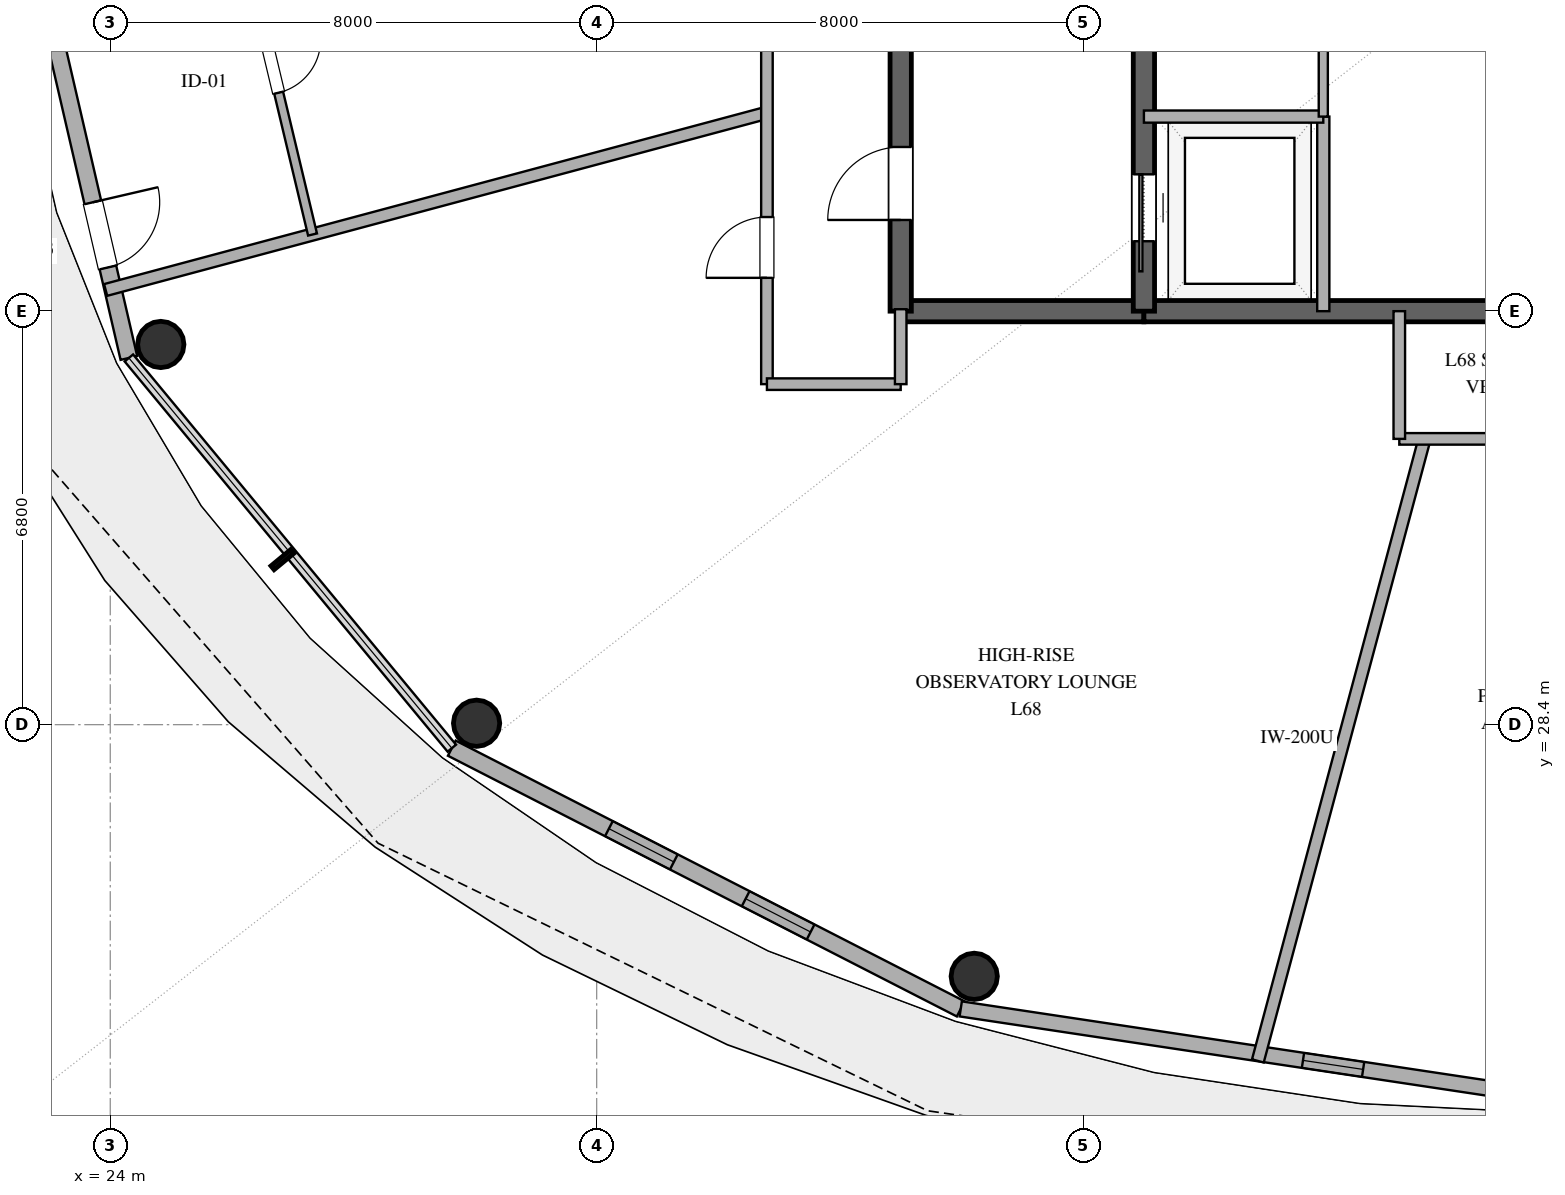
"""IFC4 building model, lengths in metres.
Left out: names, types, materials, properties, quantities, classifications, styles, units other than length and angle.
Written with IfcOpenShell. Run it as: python <this file> out.ifc"""

import sys

from ifc_helpers import new_model, si_unit, direction, frame, frame_2d, origin, origin_2d, place, context, subcontext, project, spatial, rectangle, hollow_circle, extrude, element, fill, save


model = new_model("IFC4")
c1 = context("Model", 3, precision=1e-05, world=origin(), true_north=direction((0.0, 1.0)))
c2 = subcontext(c1, "Body", "Model", "MODEL_VIEW")
j1 = project(units=[si_unit("LENGTHUNIT", "METRE"), si_unit("PLANEANGLEUNIT", "RADIAN")], contexts=[c1])
p1 = place(None, origin())
s1 = spatial("IfcSite", under=j1, at=p1, CompositionType="ELEMENT")
p2 = place(p1, origin())
s2 = spatial("IfcBuilding", under=s1, at=p2, CompositionType="ELEMENT")
p3 = place(p2, frame((0.0, 0.0, 265.8)))
s3 = spatial("IfcBuildingStorey", under=s2, at=p3, CompositionType="ELEMENT", Elevation=265.8)
p4 = place(p3, frame((37.0, 35.2, 0.0), z_axis=(0.0, 0.0, 1.0), x_axis=(1.0, 0.0, 0.0)))
e1 = element("IfcWall", 1, at=p4, inside=s3, PredefinedType="SHEAR", context=c2, shape_type="SweptSolid", body=[
    extrude(rectangle(XDim=4.0, YDim=0.35, at=frame_2d((2.0, 0.0))), origin(), (0.0, 0.0, 1.0), 3.37),
])
p5 = place(p3, frame((41.0, 35.2, 0.0), z_axis=(0.0, 0.0, 1.0), x_axis=(1.0, 0.0, 0.0)))
e2 = element("IfcWall", 2, at=p5, inside=s3, PredefinedType="SHEAR", context=c2, shape_type="SweptSolid", body=[
    extrude(rectangle(XDim=14.0, YDim=0.35, at=frame_2d((7.0, 0.0))), origin(), (0.0, 0.0, 1.0), 3.37),
])
p6 = place(p5, frame((6.1, 0.0, 0.0)))
e3 = element("IfcOpeningElement", 3, at=p6, cuts=e2, PredefinedType="OPENING", context=c2, shape_type="SweptSolid", body=[
    extrude(rectangle(XDim=1.8, YDim=2.25, at=frame_2d((0.9, 1.125))), frame((0.0, 0.185, 0.0), z_axis=(0.0, -1.0, 0.0), x_axis=(1.0, 0.0, 0.0)), (0.0, 0.0, 1.0), 0.37),
])
p7 = place(p3, frame((37.0, 35.2, 0.0), z_axis=(0.0, 0.0, 1.0), x_axis=(0.0, 1.0, 0.0)))
e4 = element("IfcWall", 4, at=p7, inside=s3, PredefinedType="SHEAR", context=c2, shape_type="SweptSolid", body=[
    extrude(rectangle(XDim=13.6, YDim=0.35, at=frame_2d((6.8, 0.0))), origin(), (0.0, 0.0, 1.0), 3.37),
])
p8 = place(p7, frame((1.5, 0.0, 0.0)))
e5 = element("IfcOpeningElement", 5, at=p8, cuts=e4, PredefinedType="OPENING", context=c2, shape_type="SweptSolid", body=[
    extrude(rectangle(XDim=1.2, YDim=2.15, at=frame_2d((0.6, 1.075))), frame((0.0, 0.185, 0.0), z_axis=(0.0, -1.0, 0.0), x_axis=(1.0, 0.0, 0.0)), (0.0, 0.0, 1.0), 0.37),
])
p9 = place(p3, frame((41.0, 35.2, 0.0), z_axis=(0.0, 0.0, 1.0), x_axis=(0.0, 1.0, 0.0)))
e6 = element("IfcWall", 6, at=p9, inside=s3, PredefinedType="SHEAR", context=c2, shape_type="SweptSolid", body=[
    extrude(rectangle(XDim=13.6, YDim=0.35, at=frame_2d((6.8, 0.0))), origin(), (0.0, 0.0, 1.0), 3.37),
])
p10 = place(p9, frame((1.15, 0.0, 0.0)))
e7 = element("IfcOpeningElement", 7, at=p10, cuts=e6, PredefinedType="OPENING", context=c2, shape_type="SweptSolid", body=[
    extrude(rectangle(XDim=1.1, YDim=2.2, at=frame_2d((0.55, 1.1))), frame((0.0, 0.185, 0.0), z_axis=(0.0, -1.0, 0.0), x_axis=(1.0, 0.0, 0.0)), (0.0, 0.0, 1.0), 0.37),
])
for number, where, z_axis, x_axis in (
    (8, (24.831, 34.653, 0.0), (0.0, 0.0, 1.0), (1.0, 0.0, 0.0)),
    (9, (30.025, 28.424, 0.0), (0.0, 0.0, 1.0), (1.0, 0.0, 0.0)),
    (10, (38.209, 24.261, 0.0), (0.0, 0.0, 1.0), (1.0, 0.0, 0.0)),
):
    element("IfcColumn", number, at=place(p3, frame(where, z_axis=z_axis, x_axis=x_axis)), inside=s3, PredefinedType="COLUMN", context=c2, shape_type="SweptSolid", body=[
        extrude(hollow_circle(Radius=0.381, WallThickness=0.025, at=origin_2d()), origin(), (0.0, 0.0, 1.0), 3.37),
    ])
p11 = place(p3, frame((22.553, 42.0, 0.0), z_axis=(0.0, 0.0, 1.0), x_axis=(0.225635078214, -0.974211892495, 0.0)))
e11 = element("IfcWall", 11, at=p11, inside=s3, PredefinedType="SOLIDWALL", context=c2, shape_type="SweptSolid", body=[
    extrude(rectangle(XDim=7.77, YDim=0.28, at=frame_2d((3.885, 0.0))), origin(), (0.0, 0.0, 1.0), 3.37),
])
p12 = place(p11, frame((5.142, 0.0, 0.0)))
e12 = element("IfcOpeningElement", 12, at=p12, cuts=e11, PredefinedType="OPENING", context=c2, shape_type="SweptSolid", body=[
    extrude(rectangle(XDim=1.1, YDim=2.25, at=frame_2d((0.55, 1.125))), frame((0.0, 0.15, 0.0), z_axis=(0.0, -1.0, 0.0), x_axis=(1.0, 0.0, 0.0)), (0.0, 0.0, 1.0), 0.3),
])
p13 = place(p3, frame((29.617, 28.013, 0.0), z_axis=(0.0, 0.0, 1.0), x_axis=(0.890007394051, -0.455946091699, 0.0)))
e13 = element("IfcWall", 13, at=p13, inside=s3, PredefinedType="SOLIDWALL", context=c2, shape_type="SweptSolid", body=[
    extrude(rectangle(XDim=9.404, YDim=0.28, at=frame_2d((4.702, 0.0))), origin(), (0.0, 0.0, 1.0), 3.37),
])
p14 = place(p13, frame((2.903, 0.0, 0.85)))
e14 = element("IfcOpeningElement", 14, at=p14, cuts=e13, PredefinedType="OPENING", context=c2, shape_type="SweptSolid", body=[
    extrude(rectangle(XDim=1.2, YDim=1.6, at=frame_2d((0.6, 0.8))), frame((0.0, 0.15, 0.0), z_axis=(0.0, -1.0, 0.0), x_axis=(1.0, 0.0, 0.0)), (0.0, 0.0, 1.0), 0.3),
])
p15 = place(p13, frame((5.43, 0.0, 0.85)))
e15 = element("IfcOpeningElement", 15, at=p15, cuts=e13, PredefinedType="OPENING", context=c2, shape_type="SweptSolid", body=[
    extrude(rectangle(XDim=1.2, YDim=1.6, at=frame_2d((0.6, 0.8))), frame((0.0, 0.15, 0.0), z_axis=(0.0, -1.0, 0.0), x_axis=(1.0, 0.0, 0.0)), (0.0, 0.0, 1.0), 0.3),
])
p16 = place(p3, frame((37.987, 23.726, 0.0), z_axis=(0.0, 0.0, 1.0), x_axis=(0.988882522213, -0.148698881169, 0.0)))
e16 = element("IfcWall", 16, at=p16, inside=s3, PredefinedType="SOLIDWALL", context=c2, shape_type="SweptSolid", body=[
    extrude(rectangle(XDim=10.125, YDim=0.25, at=frame_2d((5.062, 0.0))), origin(), (0.0, 0.0, 1.0), 3.37),
])
p17 = place(p16, frame((5.692, 0.0, 0.35)))
e17 = element("IfcOpeningElement", 17, at=p17, cuts=e16, PredefinedType="OPENING", context=c2, shape_type="SweptSolid", body=[
    extrude(rectangle(XDim=1.0, YDim=1.05, at=frame_2d((0.5, 0.525))), frame((0.0, 0.135, 0.0), z_axis=(0.0, -1.0, 0.0), x_axis=(1.0, 0.0, 0.0)), (0.0, 0.0, 1.0), 0.27),
])
p18 = place(p3, frame((43.95, 35.2, 0.0), z_axis=(0.0, 0.0, 1.0), x_axis=(0.0, 1.0, 0.0)))
e18 = element("IfcWall", 18, at=p18, inside=s3, PredefinedType="SOLIDWALL", context=c2, shape_type="SweptSolid", body=[
    extrude(rectangle(XDim=3.2, YDim=0.2, at=frame_2d((1.6, 0.0))), origin(), (0.0, 0.0, 1.0), 2.73),
])
p19 = place(p3, frame((41.0, 38.4, 0.0), z_axis=(0.0, 0.0, 1.0), x_axis=(1.0, 0.0, 0.0)))
e19 = element("IfcWall", 19, at=p19, inside=s3, PredefinedType="SOLIDWALL", context=c2, shape_type="SweptSolid", body=[
    extrude(rectangle(XDim=2.95, YDim=0.2, at=frame_2d((1.475, 0.0))), origin(), (0.0, 0.0, 1.0), 2.73),
])
p20 = place(p3, frame((43.95, 38.4, 0.0), z_axis=(0.0, 0.0, 1.0), x_axis=(0.0, 1.0, 0.0)))
e20 = element("IfcWall", 20, at=p20, inside=s3, PredefinedType="PARTITIONING", context=c2, shape_type="SweptSolid", body=[
    extrude(rectangle(XDim=4.0, YDim=0.15, at=frame_2d((2.0, 0.0))), origin(), (0.0, 0.0, 1.0), 2.73),
])
p21 = place(p20, frame((1.5, 0.0, 0.0)))
e21 = element("IfcOpeningElement", 21, at=p21, cuts=e20, PredefinedType="OPENING", context=c2, shape_type="SweptSolid", body=[
    extrude(rectangle(XDim=0.9, YDim=2.15, at=frame_2d((0.45, 1.075))), frame((0.0, 0.085, 0.0), z_axis=(0.0, -1.0, 0.0), x_axis=(1.0, 0.0, 0.0)), (0.0, 0.0, 1.0), 0.17),
])
p22 = place(p3, frame((42.874, 22.87, 0.0), z_axis=(0.0, 0.0, 1.0), x_axis=(0.258827496332, 0.965923561749, 0.0)))
e22 = element("IfcWall", 22, at=p22, inside=s3, PredefinedType="PARTITIONING", context=c2, shape_type="SweptSolid", body=[
    extrude(rectangle(XDim=10.591, YDim=0.2, at=frame_2d((5.295, 0.0))), origin(), (0.0, 0.0, 1.0), 2.73),
])
p23 = place(p3, frame((23.924, 35.549, 0.0), z_axis=(0.0, 0.0, 1.0), x_axis=(0.965923661364, 0.258827124578, 0.0)))
e23 = element("IfcWall", 23, at=p23, inside=s3, PredefinedType="PARTITIONING", context=c2, shape_type="SweptSolid", body=[
    extrude(rectangle(XDim=11.26, YDim=0.2, at=frame_2d((5.63, 0.0))), origin(), (0.0, 0.0, 1.0), 2.73),
])
p24 = place(p3, frame((34.8, 34.0, 0.0), z_axis=(0.0, 0.0, 1.0), x_axis=(0.0, 1.0, 0.0)))
e24 = element("IfcWall", 24, at=p24, inside=s3, PredefinedType="PARTITIONING", context=c2, shape_type="SweptSolid", body=[
    extrude(rectangle(XDim=12.196, YDim=0.19, at=frame_2d((6.098, 0.0))), origin(), (0.0, 0.0, 1.0), 2.73),
])
p25 = place(p24, frame((1.748, 0.0, 0.0)))
e25 = element("IfcOpeningElement", 25, at=p25, cuts=e24, PredefinedType="OPENING", context=c2, shape_type="SweptSolid", body=[
    extrude(rectangle(XDim=1.0, YDim=2.2, at=frame_2d((0.5, 1.1))), frame((0.0, 0.105, 0.0), z_axis=(0.0, -1.0, 0.0), x_axis=(1.0, 0.0, 0.0)), (0.0, 0.0, 1.0), 0.21),
])
p26 = place(p3, frame((26.004, 42.0, 0.0), z_axis=(0.0, 0.0, 1.0), x_axis=(0.232304342064, -0.972643147644, 0.0)))
e26 = element("IfcWall", 26, at=p26, inside=s3, PredefinedType="PARTITIONING", context=c2, shape_type="SweptSolid", body=[
    extrude(rectangle(XDim=5.695, YDim=0.15, at=frame_2d((2.848, 0.0))), origin(), (0.0, 0.0, 1.0), 2.73),
])
p27 = place(p26, frame((2.398, 0.0, 0.0)))
e27 = element("IfcOpeningElement", 27, at=p27, cuts=e26, PredefinedType="OPENING", context=c2, shape_type="SweptSolid", body=[
    extrude(rectangle(XDim=0.9, YDim=2.1, at=frame_2d((0.45, 1.05))), frame((0.0, 0.085, 0.0), z_axis=(0.0, -1.0, 0.0), x_axis=(1.0, 0.0, 0.0)), (0.0, 0.0, 1.0), 0.17),
])
p28 = place(p3, frame((50.8, 33.1, 0.0), z_axis=(0.0, 0.0, 1.0), x_axis=(-1.0, 0.0, 0.0)))
e28 = element("IfcWall", 28, at=p28, inside=s3, PredefinedType="PARTITIONING", context=c2, shape_type="SweptSolid", body=[
    extrude(rectangle(XDim=5.6, YDim=0.19, at=frame_2d((2.8, 0.0))), origin(), (0.0, 0.0, 1.0), 2.73),
])
p29 = place(p28, frame((2.3, 0.0, 0.0)))
e29 = element("IfcOpeningElement", 29, at=p29, cuts=e28, PredefinedType="OPENING", context=c2, shape_type="SweptSolid", body=[
    extrude(rectangle(XDim=1.0, YDim=2.2, at=frame_2d((0.5, 1.1))), frame((0.0, 0.105, 0.0), z_axis=(0.0, -1.0, 0.0), x_axis=(1.0, 0.0, 0.0)), (0.0, 0.0, 1.0), 0.21),
])
p30 = place(p3, frame((37.0, 34.0, 0.0), z_axis=(0.0, 0.0, 1.0), x_axis=(-1.0, 0.0, 0.0)))
e30 = element("IfcWall", 30, at=p30, inside=s3, PredefinedType="PARTITIONING", context=c2, shape_type="SweptSolid", body=[
    extrude(rectangle(XDim=2.2, YDim=0.19, at=frame_2d((1.1, 0.0))), origin(), (0.0, 0.0, 1.0), 2.73),
])
p31 = place(p3, frame((45.2, 35.2, 0.0), z_axis=(0.0, 0.0, 1.0), x_axis=(0.0, -1.0, 0.0)))
e31 = element("IfcWall", 31, at=p31, inside=s3, PredefinedType="PARTITIONING", context=c2, shape_type="SweptSolid", body=[
    extrude(rectangle(XDim=2.1, YDim=0.19, at=frame_2d((1.05, 0.0))), origin(), (0.0, 0.0, 1.0), 2.73),
])
p32 = place(p3, frame((37.0, 35.232, 0.0), z_axis=(0.0, 0.0, 1.0), x_axis=(0.0, -1.0, 0.0)))
e32 = element("IfcWall", 32, at=p32, inside=s3, PredefinedType="PARTITIONING", context=c2, shape_type="SweptSolid", body=[
    extrude(rectangle(XDim=1.232, YDim=0.19, at=frame_2d((0.616, 0.0))), origin(), (0.0, 0.0, 1.0), 2.73),
])
p33 = place(p12, origin())
e33 = element("IfcDoor", 33, at=p33, inside=s3, OperationType="SINGLE_SWING_LEFT", PredefinedType="DOOR", context=c2, shape_type="SweptSolid", body=[
    extrude(rectangle(XDim=1.1, YDim=2.25, at=frame_2d((0.55, 1.125))), frame((0.0, 0.025, 0.0), z_axis=(0.0, -1.0, 0.0), x_axis=(1.0, 0.0, 0.0)), (0.0, 0.0, 1.0), 0.05),
])
fill(e12, e33)
p34 = place(p14, origin())
e34 = element("IfcWindow", 34, at=p34, inside=s3, PartitioningType="SINGLE_PANEL", PredefinedType="WINDOW", context=c2, shape_type="SweptSolid", body=[
    extrude(rectangle(XDim=1.2, YDim=1.6, at=frame_2d((0.6, 0.8))), frame((0.0, 0.03, 0.0), z_axis=(0.0, -1.0, 0.0), x_axis=(1.0, 0.0, 0.0)), (0.0, 0.0, 1.0), 0.06),
])
fill(e14, e34)
p35 = place(p15, origin())
e35 = element("IfcWindow", 35, at=p35, inside=s3, PartitioningType="SINGLE_PANEL", PredefinedType="WINDOW", context=c2, shape_type="SweptSolid", body=[
    extrude(rectangle(XDim=1.2, YDim=1.6, at=frame_2d((0.6, 0.8))), frame((0.0, 0.03, 0.0), z_axis=(0.0, -1.0, 0.0), x_axis=(1.0, 0.0, 0.0)), (0.0, 0.0, 1.0), 0.06),
])
fill(e15, e35)
p36 = place(p17, origin())
e36 = element("IfcWindow", 36, at=p36, inside=s3, PartitioningType="SINGLE_PANEL", PredefinedType="WINDOW", context=c2, shape_type="SweptSolid", body=[
    extrude(rectangle(XDim=1.0, YDim=1.05, at=frame_2d((0.5, 0.525))), frame((0.0, 0.03, 0.0), z_axis=(0.0, -1.0, 0.0), x_axis=(1.0, 0.0, 0.0)), (0.0, 0.0, 1.0), 0.06),
])
fill(e17, e36)
p37 = place(p10, origin())
e37 = element("IfcDoor", 37, at=p37, inside=s3, OperationType="SLIDING_TO_LEFT", PredefinedType="DOOR", context=c2, shape_type="SweptSolid", body=[
    extrude(rectangle(XDim=1.1, YDim=2.2, at=frame_2d((0.55, 1.1))), frame((0.0, 0.025, 0.0), z_axis=(0.0, -1.0, 0.0), x_axis=(1.0, 0.0, 0.0)), (0.0, 0.0, 1.0), 0.05),
])
fill(e7, e37)
p38 = place(p8, origin())
e38 = element("IfcDoor", 38, at=p38, inside=s3, OperationType="SINGLE_SWING_LEFT", PredefinedType="DOOR", context=c2, shape_type="SweptSolid", body=[
    extrude(rectangle(XDim=1.2, YDim=2.15, at=frame_2d((0.6, 1.075))), frame((0.0, 0.025, 0.0), z_axis=(0.0, -1.0, 0.0), x_axis=(1.0, 0.0, 0.0)), (0.0, 0.0, 1.0), 0.05),
])
fill(e5, e38)
p39 = place(p25, origin())
e39 = element("IfcDoor", 39, at=p39, inside=s3, OperationType="SINGLE_SWING_LEFT", PredefinedType="DOOR", context=c2, shape_type="SweptSolid", body=[
    extrude(rectangle(XDim=1.0, YDim=2.2, at=frame_2d((0.5, 1.1))), frame((0.0, 0.025, 0.0), z_axis=(0.0, -1.0, 0.0), x_axis=(1.0, 0.0, 0.0)), (0.0, 0.0, 1.0), 0.05),
])
fill(e25, e39)
p40 = place(p27, origin())
e40 = element("IfcDoor", 40, at=p40, inside=s3, OperationType="SINGLE_SWING_LEFT", PredefinedType="DOOR", context=c2, shape_type="SweptSolid", body=[
    extrude(rectangle(XDim=0.9, YDim=2.1, at=frame_2d((0.45, 1.05))), frame((0.0, 0.025, 0.0), z_axis=(0.0, -1.0, 0.0), x_axis=(1.0, 0.0, 0.0)), (0.0, 0.0, 1.0), 0.05),
])
fill(e27, e40)
save(model, sys.argv[1])
